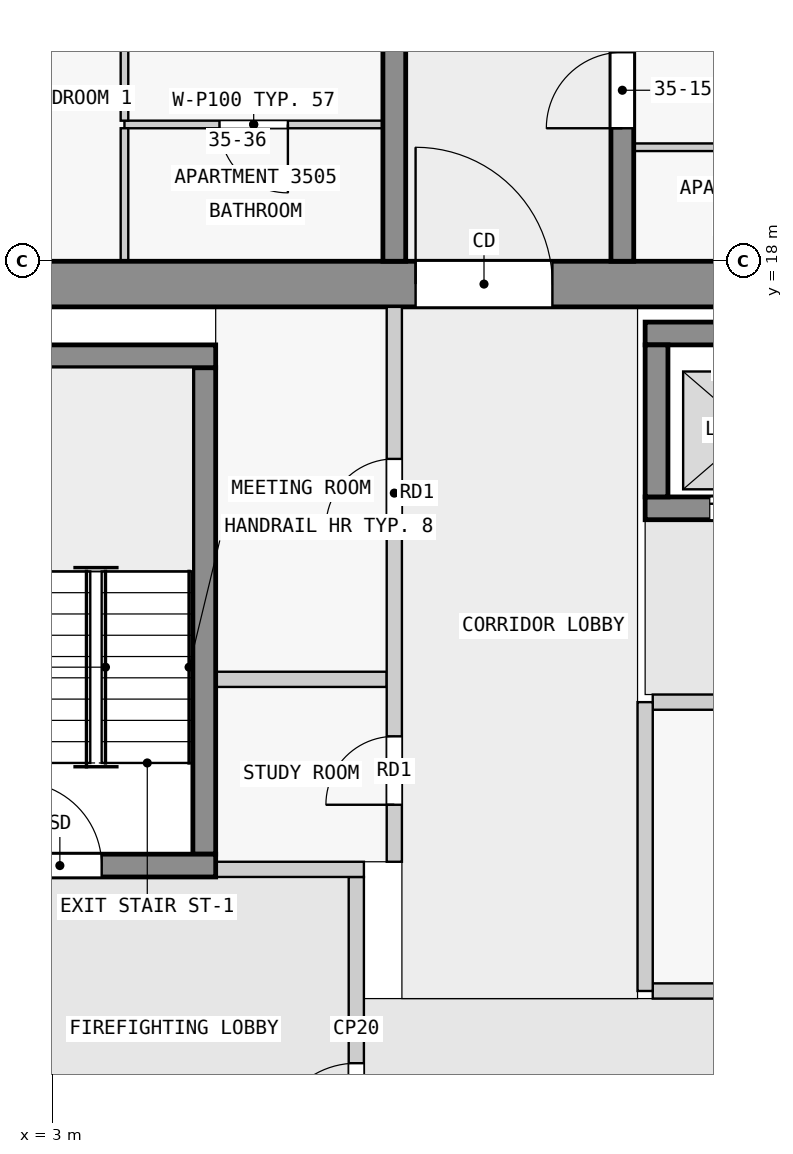
"""IFC4 building model, lengths in metres.
Left out: names, types, materials, properties, quantities, classifications, styles, units other than length and angle.
Written with IfcOpenShell. Run it as: python <this file> out.ifc"""

import sys

from ifc_helpers import new_model, si_unit, direction, frame, frame_2d, origin, place, context, subcontext, project, spatial, rectangle, extrude, element, fill, save


model = new_model("IFC4")
c1 = context("Model", 3, precision=1e-05, world=origin(), true_north=direction((0.0, 1.0)))
c2 = subcontext(c1, "Body", "Model", "MODEL_VIEW")
j1 = project(units=[si_unit("LENGTHUNIT", "METRE"), si_unit("PLANEANGLEUNIT", "RADIAN")], contexts=[c1])
p1 = place(None, origin())
s1 = spatial("IfcSite", under=j1, at=p1, CompositionType="ELEMENT")
p2 = place(p1, origin())
s2 = spatial("IfcBuilding", under=s1, at=p2, CompositionType="ELEMENT")
p3 = place(p2, frame((0.0, 0.0, 139.4)))
s3 = spatial("IfcBuildingStorey", under=s2, at=p3, CompositionType="ELEMENT", Elevation=139.4)
p4 = place(p3, frame((1.38, 17.7, 0.0), z_axis=(0.0, 0.0, 1.0), x_axis=(1.0, 0.0, 0.0)))
e1 = element("IfcWall", 1, at=p4, inside=s3, PredefinedType="SHEAR", context=c2, shape_type="SweptSolid", body=[
    extrude(rectangle(XDim=21.12, YDim=0.6, at=frame_2d((10.56, 0.0))), origin(), (0.0, 0.0, 1.0), 3.25),
])
p5 = place(p4, frame((6.4, 0.0, 0.0)))
e2 = element("IfcOpeningElement", 2, at=p5, cuts=e1, PredefinedType="OPENING", context=c2, shape_type="SweptSolid", body=[
    extrude(rectangle(XDim=1.8, YDim=2.1, at=frame_2d((0.9, 1.05))), frame((0.0, 0.31, 0.0), z_axis=(0.0, -1.0, 0.0), x_axis=(1.0, 0.0, 0.0)), (0.0, 0.0, 1.0), 0.62),
])
p6 = place(p3, frame((2.3, 10.05, 0.0), z_axis=(0.0, 0.0, 1.0), x_axis=(1.0, 0.0, 0.0)))
e3 = element("IfcWall", 3, at=p6, inside=s3, PredefinedType="SHEAR", context=c2, shape_type="SweptSolid", body=[
    extrude(rectangle(XDim=2.85, YDim=0.3, at=frame_2d((1.425, 0.0))), origin(), (0.0, 0.0, 1.0), 3.25),
])
p7 = place(p6, frame((0.25, 0.0, 0.0)))
e4 = element("IfcOpeningElement", 4, at=p7, cuts=e3, PredefinedType="OPENING", context=c2, shape_type="SweptSolid", body=[
    extrude(rectangle(XDim=1.1, YDim=2.1, at=frame_2d((0.55, 1.05))), frame((0.0, 0.16, 0.0), z_axis=(0.0, -1.0, 0.0), x_axis=(1.0, 0.0, 0.0)), (0.0, 0.0, 1.0), 0.32),
])
p8 = place(p3, frame((5.0, 10.2, 0.0), z_axis=(0.0, 0.0, 1.0), x_axis=(0.0, 1.0, 0.0)))
e5 = element("IfcWall", 5, at=p8, inside=s3, PredefinedType="SHEAR", context=c2, shape_type="SweptSolid", body=[
    extrude(rectangle(XDim=6.4, YDim=0.3, at=frame_2d((3.2, 0.0))), origin(), (0.0, 0.0, 1.0), 3.25),
])
p9 = place(p3, frame((2.3, 16.75, 0.0), z_axis=(0.0, 0.0, 1.0), x_axis=(1.0, 0.0, 0.0)))
e6 = element("IfcWall", 6, at=p9, inside=s3, PredefinedType="SHEAR", context=c2, shape_type="SweptSolid", body=[
    extrude(rectangle(XDim=2.85, YDim=0.3, at=frame_2d((1.425, 0.0))), origin(), (0.0, 0.0, 1.0), 3.25),
])
p10 = place(p3, frame((10.8, 17.05, 0.0), z_axis=(0.0, 0.0, 1.0), x_axis=(1.0, 0.0, 0.0)))
e7 = element("IfcWall", 7, at=p10, inside=s3, PredefinedType="SHEAR", context=c2, shape_type="SweptSolid", body=[
    extrude(rectangle(XDim=7.8, YDim=0.3, at=frame_2d((3.9, 0.0))), origin(), (0.0, 0.0, 1.0), 3.25),
])
p11 = place(p3, frame((10.8, 14.75, 0.0), z_axis=(0.0, 0.0, 1.0), x_axis=(1.0, 0.0, 0.0)))
e8 = element("IfcWall", 8, at=p11, inside=s3, PredefinedType="SHEAR", context=c2, shape_type="SweptSolid", body=[
    extrude(rectangle(XDim=7.8, YDim=0.3, at=frame_2d((3.9, 0.0))), origin(), (0.0, 0.0, 1.0), 3.25),
])
p12 = place(p11, frame((0.85, 0.0, 0.0)))
e9 = element("IfcOpeningElement", 9, at=p12, cuts=e8, PredefinedType="OPENING", context=c2, shape_type="SweptSolid", body=[
    extrude(rectangle(XDim=1.1, YDim=2.1, at=frame_2d((0.55, 1.05))), frame((0.0, 0.16, 0.0), z_axis=(0.0, -1.0, 0.0), x_axis=(1.0, 0.0, 0.0)), (0.0, 0.0, 1.0), 0.32),
])
p13 = place(p11, frame((3.35, 0.0, 0.0)))
e10 = element("IfcOpeningElement", 10, at=p13, cuts=e8, PredefinedType="OPENING", context=c2, shape_type="SweptSolid", body=[
    extrude(rectangle(XDim=1.1, YDim=2.1, at=frame_2d((0.55, 1.05))), frame((0.0, 0.16, 0.0), z_axis=(0.0, -1.0, 0.0), x_axis=(1.0, 0.0, 0.0)), (0.0, 0.0, 1.0), 0.32),
])
p14 = place(p11, frame((5.85, 0.0, 0.0)))
e11 = element("IfcOpeningElement", 11, at=p14, cuts=e8, PredefinedType="OPENING", context=c2, shape_type="SweptSolid", body=[
    extrude(rectangle(XDim=1.1, YDim=2.1, at=frame_2d((0.55, 1.05))), frame((0.0, 0.16, 0.0), z_axis=(0.0, -1.0, 0.0), x_axis=(1.0, 0.0, 0.0)), (0.0, 0.0, 1.0), 0.32),
])
p15 = place(p3, frame((10.95, 14.9, 0.0), z_axis=(0.0, 0.0, 1.0), x_axis=(0.0, 1.0, 0.0)))
e12 = element("IfcWall", 12, at=p15, inside=s3, PredefinedType="SHEAR", context=c2, shape_type="SweptSolid", body=[
    extrude(rectangle(XDim=2.0, YDim=0.3, at=frame_2d((1.0, 0.0))), origin(), (0.0, 0.0, 1.0), 3.25),
])
p16 = place(p3, frame((7.5, 18.0, 0.0), z_axis=(0.0, 0.0, 1.0), x_axis=(0.0, 1.0, 0.0)))
e13 = element("IfcWall", 13, at=p16, inside=s3, PredefinedType="SHEAR", context=c2, shape_type="SweptSolid", body=[
    extrude(rectangle(XDim=27.0, YDim=0.3, at=frame_2d((13.5, 0.0))), origin(), (0.0, 0.0, 1.0), 3.25),
])
p17 = place(p16, frame((4.05, 0.0, 0.0)))
e14 = element("IfcOpeningElement", 14, at=p17, cuts=e13, PredefinedType="OPENING", context=c2, shape_type="SweptSolid", body=[
    extrude(rectangle(XDim=1.0, YDim=2.1, at=frame_2d((0.5, 1.05))), frame((0.0, 0.16, 0.0), z_axis=(0.0, -1.0, 0.0), x_axis=(1.0, 0.0, 0.0)), (0.0, 0.0, 1.0), 0.32),
])
p18 = place(p16, frame((10.75, 0.0, 0.0)))
e15 = element("IfcOpeningElement", 15, at=p18, cuts=e13, PredefinedType="OPENING", context=c2, shape_type="SweptSolid", body=[
    extrude(rectangle(XDim=1.0, YDim=2.1, at=frame_2d((0.5, 1.05))), frame((0.0, 0.16, 0.0), z_axis=(0.0, -1.0, 0.0), x_axis=(1.0, 0.0, 0.0)), (0.0, 0.0, 1.0), 0.32),
])
p19 = place(p16, frame((17.55, 0.0, 0.0)))
e16 = element("IfcOpeningElement", 16, at=p19, cuts=e13, PredefinedType="OPENING", context=c2, shape_type="SweptSolid", body=[
    extrude(rectangle(XDim=1.0, YDim=2.1, at=frame_2d((0.5, 1.05))), frame((0.0, 0.16, 0.0), z_axis=(0.0, -1.0, 0.0), x_axis=(1.0, 0.0, 0.0)), (0.0, 0.0, 1.0), 0.32),
])
p20 = place(p16, frame((23.25, 0.0, 0.0)))
e17 = element("IfcOpeningElement", 17, at=p20, cuts=e13, PredefinedType="OPENING", context=c2, shape_type="SweptSolid", body=[
    extrude(rectangle(XDim=0.9, YDim=2.1, at=frame_2d((0.45, 1.05))), frame((0.0, 0.16, 0.0), z_axis=(0.0, -1.0, 0.0), x_axis=(1.0, 0.0, 0.0)), (0.0, 0.0, 1.0), 0.32),
])
p21 = place(p16, frame((25.45, 0.0, 0.0)))
e18 = element("IfcOpeningElement", 18, at=p21, cuts=e13, PredefinedType="OPENING", context=c2, shape_type="SweptSolid", body=[
    extrude(rectangle(XDim=1.0, YDim=2.1, at=frame_2d((0.5, 1.05))), frame((0.0, 0.16, 0.0), z_axis=(0.0, -1.0, 0.0), x_axis=(1.0, 0.0, 0.0)), (0.0, 0.0, 1.0), 0.32),
])
p22 = place(p3, frame((10.5, 18.0, 0.0), z_axis=(0.0, 0.0, 1.0), x_axis=(0.0, 1.0, 0.0)))
e19 = element("IfcWall", 19, at=p22, inside=s3, PredefinedType="SHEAR", context=c2, shape_type="SweptSolid", body=[
    extrude(rectangle(XDim=27.0, YDim=0.3, at=frame_2d((13.5, 0.0))), origin(), (0.0, 0.0, 1.0), 3.25),
])
p23 = place(p22, frame((1.75, 0.0, 0.0)))
e20 = element("IfcOpeningElement", 20, at=p23, cuts=e19, PredefinedType="OPENING", context=c2, shape_type="SweptSolid", body=[
    extrude(rectangle(XDim=1.0, YDim=2.1, at=frame_2d((0.5, 1.05))), frame((0.0, 0.16, 0.0), z_axis=(0.0, -1.0, 0.0), x_axis=(1.0, 0.0, 0.0)), (0.0, 0.0, 1.0), 0.32),
])
p24 = place(p22, frame((6.25, 0.0, 0.0)))
e21 = element("IfcOpeningElement", 21, at=p24, cuts=e19, PredefinedType="OPENING", context=c2, shape_type="SweptSolid", body=[
    extrude(rectangle(XDim=1.0, YDim=2.1, at=frame_2d((0.5, 1.05))), frame((0.0, 0.16, 0.0), z_axis=(0.0, -1.0, 0.0), x_axis=(1.0, 0.0, 0.0)), (0.0, 0.0, 1.0), 0.32),
])
p25 = place(p22, frame((10.35, 0.0, 0.0)))
e22 = element("IfcOpeningElement", 22, at=p25, cuts=e19, PredefinedType="OPENING", context=c2, shape_type="SweptSolid", body=[
    extrude(rectangle(XDim=1.8, YDim=2.1, at=frame_2d((0.9, 1.05))), frame((0.0, 0.16, 0.0), z_axis=(0.0, -1.0, 0.0), x_axis=(1.0, 0.0, 0.0)), (0.0, 0.0, 1.0), 0.32),
])
p26 = place(p22, frame((15.25, 0.0, 0.0)))
e23 = element("IfcOpeningElement", 23, at=p26, cuts=e19, PredefinedType="OPENING", context=c2, shape_type="SweptSolid", body=[
    extrude(rectangle(XDim=1.0, YDim=2.1, at=frame_2d((0.5, 1.05))), frame((0.0, 0.16, 0.0), z_axis=(0.0, -1.0, 0.0), x_axis=(1.0, 0.0, 0.0)), (0.0, 0.0, 1.0), 0.32),
])
p27 = place(p22, frame((21.35, 0.0, 0.0)))
e24 = element("IfcOpeningElement", 24, at=p27, cuts=e19, PredefinedType="OPENING", context=c2, shape_type="SweptSolid", body=[
    extrude(rectangle(XDim=1.0, YDim=2.1, at=frame_2d((0.5, 1.05))), frame((0.0, 0.16, 0.0), z_axis=(0.0, -1.0, 0.0), x_axis=(1.0, 0.0, 0.0)), (0.0, 0.0, 1.0), 0.32),
])
p28 = place(p3, frame((7.0, 5.9, 0.0), z_axis=(0.0, 0.0, 1.0), x_axis=(0.0, 1.0, 0.0)))
e25 = element("IfcWall", 25, at=p28, inside=s3, PredefinedType="PARTITIONING", context=c2, shape_type="SweptSolid", body=[
    extrude(rectangle(XDim=4.0, YDim=0.2, at=frame_2d((2.0, 0.0))), origin(), (0.0, 0.0, 1.0), 3.25),
])
p29 = place(p28, frame((0.45, 0.0, 0.0)))
e26 = element("IfcOpeningElement", 26, at=p29, cuts=e25, PredefinedType="OPENING", context=c2, shape_type="SweptSolid", body=[
    extrude(rectangle(XDim=1.1, YDim=2.1, at=frame_2d((0.55, 1.05))), frame((0.0, 0.11, 0.0), z_axis=(0.0, -1.0, 0.0), x_axis=(1.0, 0.0, 0.0)), (0.0, 0.0, 1.0), 0.22),
])
p30 = place(p3, frame((5.15, 10.0, 0.0), z_axis=(0.0, 0.0, 1.0), x_axis=(1.0, 0.0, 0.0)))
e27 = element("IfcWall", 27, at=p30, inside=s3, PredefinedType="PARTITIONING", context=c2, shape_type="SweptSolid", body=[
    extrude(rectangle(XDim=1.95, YDim=0.2, at=frame_2d((0.975, 0.0))), origin(), (0.0, 0.0, 1.0), 3.25),
])
p31 = place(p3, frame((10.8, 8.4, 0.0), z_axis=(0.0, 0.0, 1.0), x_axis=(0.0, 1.0, 0.0)))
e28 = element("IfcWall", 28, at=p31, inside=s3, PredefinedType="PARTITIONING", context=c2, shape_type="SweptSolid", body=[
    extrude(rectangle(XDim=3.8, YDim=0.2, at=frame_2d((1.9, 0.0))), origin(), (0.0, 0.0, 1.0), 3.25),
])
p32 = place(p3, frame((10.9, 8.4, 0.0), z_axis=(0.0, 0.0, 1.0), x_axis=(1.0, 0.0, 0.0)))
e29 = element("IfcWall", 29, at=p32, inside=s3, PredefinedType="PARTITIONING", context=c2, shape_type="SweptSolid", body=[
    extrude(rectangle(XDim=8.5, YDim=0.2, at=frame_2d((4.25, 0.0))), origin(), (0.0, 0.0, 1.0), 3.25),
])
p33 = place(p3, frame((10.9, 12.2, 0.0), z_axis=(0.0, 0.0, 1.0), x_axis=(1.0, 0.0, 0.0)))
e30 = element("IfcWall", 30, at=p33, inside=s3, PredefinedType="PARTITIONING", context=c2, shape_type="SweptSolid", body=[
    extrude(rectangle(XDim=8.5, YDim=0.2, at=frame_2d((4.25, 0.0))), origin(), (0.0, 0.0, 1.0), 3.25),
])
p34 = place(p33, frame((3.8, 0.0, 0.0)))
e31 = element("IfcOpeningElement", 31, at=p34, cuts=e30, PredefinedType="OPENING", context=c2, shape_type="SweptSolid", body=[
    extrude(rectangle(XDim=0.9, YDim=2.1, at=frame_2d((0.45, 1.05))), frame((0.0, 0.11, 0.0), z_axis=(0.0, -1.0, 0.0), x_axis=(1.0, 0.0, 0.0)), (0.0, 0.0, 1.0), 0.22),
])
p35 = place(p3, frame((7.5, 10.1, 0.0), z_axis=(0.0, 0.0, 1.0), x_axis=(0.0, 1.0, 0.0)))
e32 = element("IfcWall", 32, at=p35, inside=s3, PredefinedType="PARTITIONING", context=c2, shape_type="SweptSolid", body=[
    extrude(rectangle(XDim=7.3, YDim=0.2, at=frame_2d((3.65, 0.0))), origin(), (0.0, 0.0, 1.0), 3.25),
])
p36 = place(p35, frame((0.75, 0.0, 0.0)))
e33 = element("IfcOpeningElement", 33, at=p36, cuts=e32, PredefinedType="OPENING", context=c2, shape_type="SweptSolid", body=[
    extrude(rectangle(XDim=0.9, YDim=2.1, at=frame_2d((0.45, 1.05))), frame((0.0, 0.11, 0.0), z_axis=(0.0, -1.0, 0.0), x_axis=(1.0, 0.0, 0.0)), (0.0, 0.0, 1.0), 0.22),
])
p37 = place(p35, frame((4.4, 0.0, 0.0)))
e34 = element("IfcOpeningElement", 34, at=p37, cuts=e32, PredefinedType="OPENING", context=c2, shape_type="SweptSolid", body=[
    extrude(rectangle(XDim=0.9, YDim=2.1, at=frame_2d((0.45, 1.05))), frame((0.0, 0.11, 0.0), z_axis=(0.0, -1.0, 0.0), x_axis=(1.0, 0.0, 0.0)), (0.0, 0.0, 1.0), 0.22),
])
p38 = place(p3, frame((5.15, 12.5, 0.0), z_axis=(0.0, 0.0, 1.0), x_axis=(1.0, 0.0, 0.0)))
e35 = element("IfcWall", 35, at=p38, inside=s3, PredefinedType="PARTITIONING", context=c2, shape_type="SweptSolid", body=[
    extrude(rectangle(XDim=2.25, YDim=0.2, at=frame_2d((1.125, 0.0))), origin(), (0.0, 0.0, 1.0), 3.25),
])
p39 = place(p3, frame((14.05, 19.5, 0.0), z_axis=(0.0, 0.0, 1.0), x_axis=(-1.0, 0.0, 0.0)))
e36 = element("IfcWall", 36, at=p39, inside=s3, PredefinedType="PARTITIONING", context=c2, shape_type="SweptSolid", body=[
    extrude(rectangle(XDim=3.4, YDim=0.1, at=frame_2d((1.7, 0.0))), origin(), (0.0, 0.0, 1.0), 3.25),
])
p40 = place(p39, frame((1.25, 0.0, 0.0)))
e37 = element("IfcOpeningElement", 37, at=p40, cuts=e36, PredefinedType="OPENING", context=c2, shape_type="SweptSolid", body=[
    extrude(rectangle(XDim=0.9, YDim=2.1, at=frame_2d((0.45, 1.05))), frame((0.0, 0.06, 0.0), z_axis=(0.0, -1.0, 0.0), x_axis=(1.0, 0.0, 0.0)), (0.0, 0.0, 1.0), 0.12),
])
p41 = place(p3, frame((7.35, 19.8, 0.0), z_axis=(0.0, 0.0, 1.0), x_axis=(-1.0, 0.0, 0.0)))
e38 = element("IfcWall", 38, at=p41, inside=s3, PredefinedType="PARTITIONING", context=c2, shape_type="SweptSolid", body=[
    extrude(rectangle(XDim=3.4, YDim=0.1, at=frame_2d((1.7, 0.0))), origin(), (0.0, 0.0, 1.0), 3.25),
])
p42 = place(p41, frame((1.25, 0.0, 0.0)))
e39 = element("IfcOpeningElement", 39, at=p42, cuts=e38, PredefinedType="OPENING", context=c2, shape_type="SweptSolid", body=[
    extrude(rectangle(XDim=0.9, YDim=2.1, at=frame_2d((0.45, 1.05))), frame((0.0, 0.06, 0.0), z_axis=(0.0, -1.0, 0.0), x_axis=(1.0, 0.0, 0.0)), (0.0, 0.0, 1.0), 0.12),
])
p43 = place(p3, frame((3.95, 19.75, 0.0), z_axis=(0.0, 0.0, 1.0), x_axis=(0.0, -1.0, 0.0)))
e40 = element("IfcWall", 40, at=p43, inside=s3, PredefinedType="PARTITIONING", context=c2, shape_type="SweptSolid", body=[
    extrude(rectangle(XDim=1.75, YDim=0.1, at=frame_2d((0.875, 0.0))), origin(), (0.0, 0.0, 1.0), 3.25),
])
p44 = place(p3, frame((3.95, 19.85, 0.0), z_axis=(0.0, 0.0, 1.0), x_axis=(0.0, 1.0, 0.0)))
e41 = element("IfcWall", 41, at=p44, inside=s3, PredefinedType="PARTITIONING", context=c2, shape_type="SweptSolid", body=[
    extrude(rectangle(XDim=2.6, YDim=0.1, at=frame_2d((1.3, 0.0))), origin(), (0.0, 0.0, 1.0), 3.25),
])
p45 = place(p29, origin())
e42 = element("IfcDoor", 42, at=p45, inside=s3, OperationType="SINGLE_SWING_LEFT", PredefinedType="DOOR", context=c2, shape_type="SweptSolid", body=[
    extrude(rectangle(XDim=1.1, YDim=2.1, at=frame_2d((0.55, 1.05))), frame((0.0, 0.025, 0.0), z_axis=(0.0, -1.0, 0.0), x_axis=(1.0, 0.0, 0.0)), (0.0, 0.0, 1.0), 0.05),
])
fill(e26, e42)
p46 = place(p7, origin())
e43 = element("IfcDoor", 43, at=p46, inside=s3, OperationType="SINGLE_SWING_RIGHT", PredefinedType="DOOR", context=c2, shape_type="SweptSolid", body=[
    extrude(rectangle(XDim=1.1, YDim=2.1, at=frame_2d((0.55, 1.05))), frame((0.0, 0.025, 0.0), z_axis=(0.0, -1.0, 0.0), x_axis=(1.0, 0.0, 0.0)), (0.0, 0.0, 1.0), 0.05),
])
fill(e4, e43)
p47 = place(p12, origin())
e44 = element("IfcDoor", 44, at=p47, inside=s3, OperationType="DOUBLE_DOOR_SLIDING", PredefinedType="DOOR", context=c2, shape_type="SweptSolid", body=[
    extrude(rectangle(XDim=1.1, YDim=2.1, at=frame_2d((0.55, 1.05))), frame((0.0, 0.025, 0.0), z_axis=(0.0, -1.0, 0.0), x_axis=(1.0, 0.0, 0.0)), (0.0, 0.0, 1.0), 0.05),
])
fill(e9, e44)
p48 = place(p5, origin())
e45 = element("IfcDoor", 45, at=p48, inside=s3, OperationType="DOUBLE_DOOR_SINGLE_SWING", PredefinedType="DOOR", context=c2, shape_type="SweptSolid", body=[
    extrude(rectangle(XDim=1.8, YDim=2.1, at=frame_2d((0.9, 1.05))), frame((0.0, 0.025, 0.0), z_axis=(0.0, -1.0, 0.0), x_axis=(1.0, 0.0, 0.0)), (0.0, 0.0, 1.0), 0.05),
])
fill(e2, e45)
p49 = place(p36, origin())
e46 = element("IfcDoor", 46, at=p49, inside=s3, OperationType="SINGLE_SWING_RIGHT", PredefinedType="DOOR", context=c2, shape_type="SweptSolid", body=[
    extrude(rectangle(XDim=0.9, YDim=2.1, at=frame_2d((0.45, 1.05))), frame((0.0, 0.025, 0.0), z_axis=(0.0, -1.0, 0.0), x_axis=(1.0, 0.0, 0.0)), (0.0, 0.0, 1.0), 0.05),
])
fill(e33, e46)
p50 = place(p37, origin())
e47 = element("IfcDoor", 47, at=p50, inside=s3, OperationType="SINGLE_SWING_RIGHT", PredefinedType="DOOR", context=c2, shape_type="SweptSolid", body=[
    extrude(rectangle(XDim=0.9, YDim=2.1, at=frame_2d((0.45, 1.05))), frame((0.0, 0.025, 0.0), z_axis=(0.0, -1.0, 0.0), x_axis=(1.0, 0.0, 0.0)), (0.0, 0.0, 1.0), 0.05),
])
fill(e34, e47)
p51 = place(p23, origin())
e48 = element("IfcDoor", 48, at=p51, inside=s3, OperationType="SINGLE_SWING_LEFT", PredefinedType="DOOR", context=c2, shape_type="SweptSolid", body=[
    extrude(rectangle(XDim=1.0, YDim=2.1, at=frame_2d((0.5, 1.05))), frame((0.0, 0.025, 0.0), z_axis=(0.0, -1.0, 0.0), x_axis=(1.0, 0.0, 0.0)), (0.0, 0.0, 1.0), 0.05),
])
fill(e20, e48)
p52 = place(p42, origin())
e49 = element("IfcDoor", 49, at=p52, inside=s3, OperationType="SINGLE_SWING_RIGHT", PredefinedType="DOOR", context=c2, shape_type="SweptSolid", body=[
    extrude(rectangle(XDim=0.9, YDim=2.1, at=frame_2d((0.45, 1.05))), frame((0.0, 0.025, 0.0), z_axis=(0.0, -1.0, 0.0), x_axis=(1.0, 0.0, 0.0)), (0.0, 0.0, 1.0), 0.05),
])
fill(e39, e49)
save(model, sys.argv[1])
